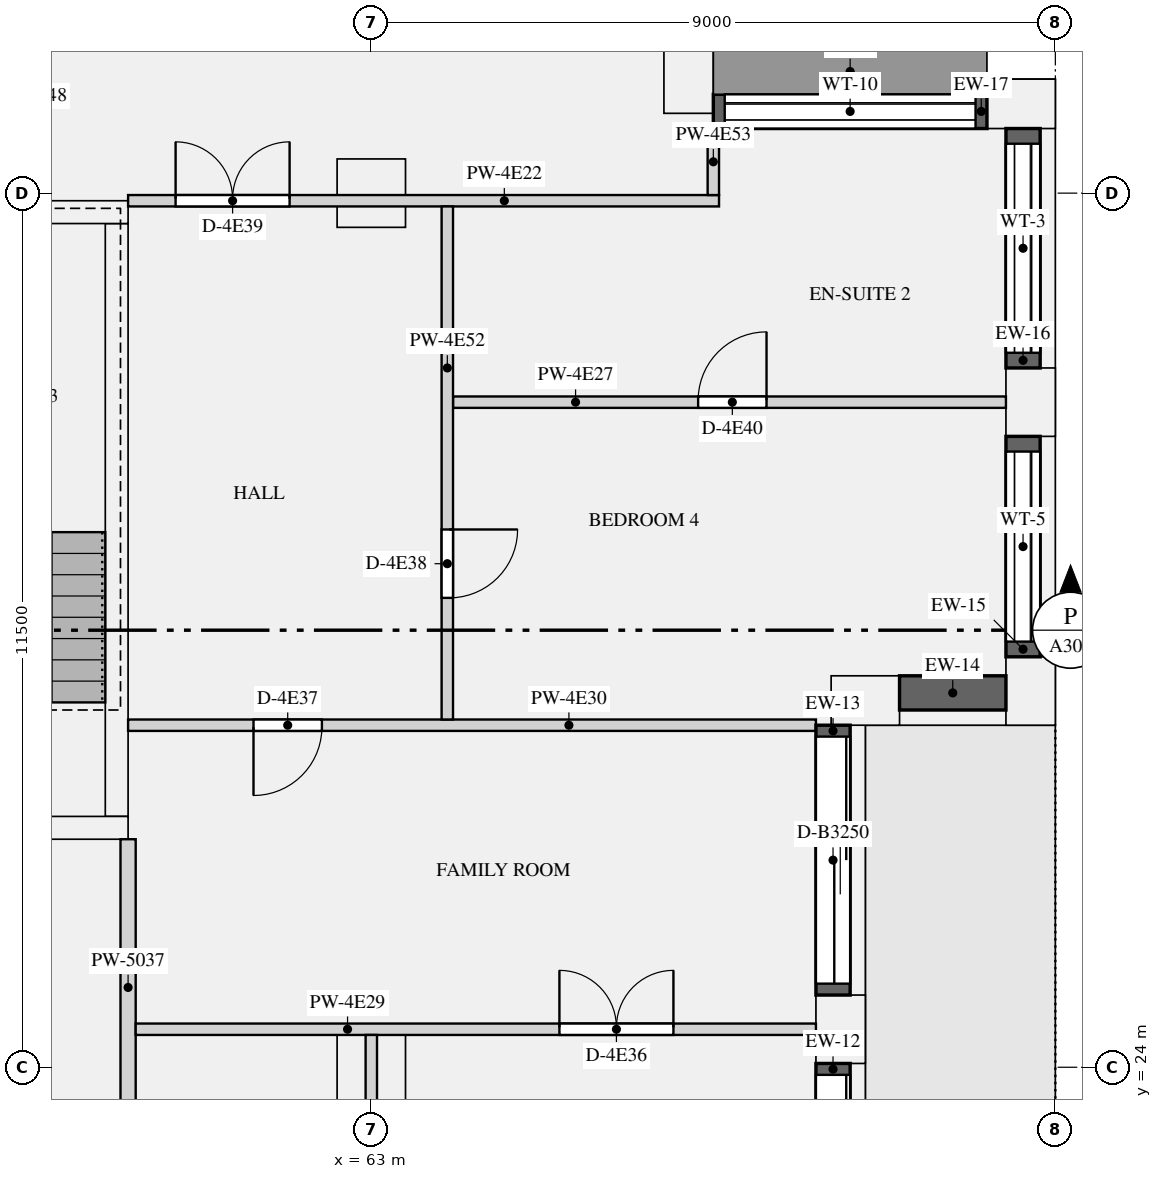
"""IFC4 building model, lengths in metres.
Left out: names, types, materials, properties, quantities, classifications, styles, units other than length and angle.
Written with IfcOpenShell. Run it as: python <this file> out.ifc"""

import sys

from ifc_helpers import new_model, si_unit, direction, frame, frame_2d, origin, origin_2d, place, context, subcontext, project, spatial, rectangle, extrude, element, fill, save


model = new_model("IFC4")
c1 = context("Model", 3, precision=1e-05, world=origin(), true_north=direction((0.0, 1.0)))
c2 = subcontext(c1, "Body", "Model", "MODEL_VIEW")
j1 = project(units=[si_unit("LENGTHUNIT", "METRE"), si_unit("PLANEANGLEUNIT", "RADIAN")], contexts=[c1])
p1 = place(None, origin())
s1 = spatial("IfcSite", under=j1, at=p1, CompositionType="ELEMENT")
p2 = place(p1, origin())
s2 = spatial("IfcBuilding", under=s1, at=p2, CompositionType="ELEMENT")
p3 = place(p2, frame((0.0, 0.0, 229.5)))
s3 = spatial("IfcBuildingStorey", under=s2, at=p3, CompositionType="ELEMENT", Elevation=229.5)
for number, where, z_axis, x_axis in (
    (1, (69.175, 24.5, 0.0), (0.0, 0.0, 1.0), (0.0, 1.0, 0.0)),
    (2, (69.5, 28.825, 0.0), (0.0, 0.0, 1.0), (1.0, 0.0, 0.0)),
    (3, (71.675, 28.95, 0.0), (0.0, 0.0, 1.0), (0.0, 1.0, 0.0)),
    (4, (71.675, 32.75, 0.0), (0.0, 0.0, 1.0), (0.0, 1.0, 0.0)),
    (5, (71.55, 36.675, 0.0), (0.0, 0.0, 1.0), (-1.0, 0.0, 0.0)),
    (6, (67.175, 37.0, 0.0), (0.0, 0.0, 1.0), (0.0, 1.0, 0.0)),
):
    element("IfcColumn", number, at=place(p3, frame(where, z_axis=z_axis, x_axis=x_axis)), inside=s3, PredefinedType="USERDEFINED", context=c2, shape_type="SweptSolid", body=[
        extrude(rectangle(XDim=0.9, YDim=0.65, at=origin_2d()), origin(), (0.0, 0.0, 1.0), 3.15),
    ])
for number, where, z_axis, x_axis in (
    (7, (63.0, 24.0, 0.0), (0.0, 0.0, 1.0), (1.0, 0.0, 0.0)),
    (8, (63.0, 35.5, 0.0), (0.0, 0.0, 1.0), (1.0, 0.0, 0.0)),
):
    element("IfcColumn", number, at=place(p3, frame(where, z_axis=z_axis, x_axis=x_axis)), inside=s3, PredefinedType="COLUMN", context=c2, shape_type="SweptSolid", body=[
        extrude(rectangle(XDim=0.9, YDim=0.9, at=origin_2d()), origin(), (0.0, 0.0, 1.0), 3.15),
    ])
p4 = place(p3, frame((56.2, 27.15, 0.0), z_axis=(0.0, 0.0, 1.0), x_axis=(1.0, 0.0, 0.0)))
e9 = element("IfcWall", 9, at=p4, inside=s3, PredefinedType="SHEAR", context=c2, shape_type="SweptSolid", body=[
    extrude(rectangle(XDim=3.6, YDim=0.3, at=frame_2d((1.8, 0.0))), origin(), (0.0, 0.0, 1.0), 3.15),
])
p5 = place(p4, frame((1.25, 0.0, 0.0)))
e10 = element("IfcOpeningElement", 10, at=p5, cuts=e9, PredefinedType="OPENING", context=c2, shape_type="SweptSolid", body=[
    extrude(rectangle(XDim=1.1, YDim=2.1, at=frame_2d((0.55, 1.05))), frame((0.0, 0.16, 0.0), z_axis=(0.0, -1.0, 0.0), x_axis=(1.0, 0.0, 0.0)), (0.0, 0.0, 1.0), 0.32),
])
p6 = place(p3, frame((56.2, 35.25, 0.0), z_axis=(0.0, 0.0, 1.0), x_axis=(1.0, 0.0, 0.0)))
e11 = element("IfcWall", 11, at=p6, inside=s3, PredefinedType="SHEAR", context=c2, shape_type="SweptSolid", body=[
    extrude(rectangle(XDim=3.6, YDim=0.3, at=frame_2d((1.8, 0.0))), origin(), (0.0, 0.0, 1.0), 3.15),
])
p7 = place(p3, frame((59.65, 27.3, 0.0), z_axis=(0.0, 0.0, 1.0), x_axis=(0.0, 1.0, 0.0)))
e12 = element("IfcWall", 12, at=p7, inside=s3, PredefinedType="SHEAR", context=c2, shape_type="SweptSolid", body=[
    extrude(rectangle(XDim=7.8, YDim=0.3, at=frame_2d((3.9, 0.0))), origin(), (0.0, 0.0, 1.0), 3.15),
])
p8 = place(p3, frame((69.075, 20.95, 0.0), z_axis=(0.0, 0.0, 1.0), x_axis=(0.0, 1.0, 0.0)))
e13 = element("IfcWall", 13, at=p8, inside=s3, PredefinedType="SOLIDWALL", context=c2, shape_type="SweptSolid", body=[
    extrude(rectangle(XDim=3.1, YDim=0.45, at=frame_2d((1.55, 0.0))), origin(), (0.0, 0.0, 1.0), 2.83),
])
p9 = place(p8, frame((0.15, 0.0, 0.0)))
e14 = element("IfcOpeningElement", 14, at=p9, cuts=e13, PredefinedType="OPENING", context=c2, shape_type="SweptSolid", body=[
    extrude(rectangle(XDim=2.8, YDim=2.3, at=frame_2d((1.4, 1.15))), frame((0.0, 0.235, 0.0), z_axis=(0.0, -1.0, 0.0), x_axis=(1.0, 0.0, 0.0)), (0.0, 0.0, 1.0), 0.47),
])
p10 = place(p3, frame((69.075, 24.95, 0.0), z_axis=(0.0, 0.0, 1.0), x_axis=(0.0, 1.0, 0.0)))
e15 = element("IfcWall", 15, at=p10, inside=s3, PredefinedType="SOLIDWALL", context=c2, shape_type="SweptSolid", body=[
    extrude(rectangle(XDim=3.55, YDim=0.45, at=frame_2d((1.775, 0.0))), origin(), (0.0, 0.0, 1.0), 2.83),
])
p11 = place(p10, frame((0.15, 0.0, 0.0)))
e16 = element("IfcOpeningElement", 16, at=p11, cuts=e15, PredefinedType="OPENING", context=c2, shape_type="SweptSolid", body=[
    extrude(rectangle(XDim=3.25, YDim=2.3, at=frame_2d((1.625, 1.15))), frame((0.0, 0.235, 0.0), z_axis=(0.0, -1.0, 0.0), x_axis=(1.0, 0.0, 0.0)), (0.0, 0.0, 1.0), 0.47),
])
p12 = place(p3, frame((69.95, 28.925, 0.9), z_axis=(0.0, 0.0, 1.0), x_axis=(1.0, 0.0, 0.0)))
e17 = element("IfcWall", 17, at=p12, inside=s3, PredefinedType="SOLIDWALL", context=c2, shape_type="SweptSolid", body=[
    extrude(rectangle(XDim=1.4, YDim=0.45, at=frame_2d((0.7, 0.0))), origin(), (0.0, 0.0, 1.0), 1.93),
])
p13 = place(p3, frame((71.575, 29.4, 0.9), z_axis=(0.0, 0.0, 1.0), x_axis=(0.0, 1.0, 0.0)))
e18 = element("IfcWall", 18, at=p13, inside=s3, PredefinedType="SOLIDWALL", context=c2, shape_type="SweptSolid", body=[
    extrude(rectangle(XDim=2.9, YDim=0.45, at=frame_2d((1.45, 0.0))), origin(), (0.0, 0.0, 1.0), 1.93),
])
p14 = place(p13, frame((0.2, 0.0, 0.15)))
e19 = element("IfcOpeningElement", 19, at=p14, cuts=e18, PredefinedType="OPENING", context=c2, shape_type="SweptSolid", body=[
    extrude(rectangle(XDim=2.5, YDim=1.5, at=frame_2d((1.25, 0.75))), frame((0.0, 0.235, 0.0), z_axis=(0.0, -1.0, 0.0), x_axis=(1.0, 0.0, 0.0)), (0.0, 0.0, 1.0), 0.47),
])
p15 = place(p3, frame((71.575, 33.2, 0.9), z_axis=(0.0, 0.0, 1.0), x_axis=(0.0, 1.0, 0.0)))
e20 = element("IfcWall", 20, at=p15, inside=s3, PredefinedType="SOLIDWALL", context=c2, shape_type="SweptSolid", body=[
    extrude(rectangle(XDim=3.15, YDim=0.45, at=frame_2d((1.575, 0.0))), origin(), (0.0, 0.0, 1.0), 1.93),
])
p16 = place(p15, frame((0.2, 0.0, 0.15)))
e21 = element("IfcOpeningElement", 21, at=p16, cuts=e20, PredefinedType="OPENING", context=c2, shape_type="SweptSolid", body=[
    extrude(rectangle(XDim=2.75, YDim=1.5, at=frame_2d((1.375, 0.75))), frame((0.0, 0.235, 0.0), z_axis=(0.0, -1.0, 0.0), x_axis=(1.0, 0.0, 0.0)), (0.0, 0.0, 1.0), 0.47),
])
p17 = place(p3, frame((71.1, 36.575, 0.9), z_axis=(0.0, 0.0, 1.0), x_axis=(-1.0, 0.0, 0.0)))
e22 = element("IfcWall", 22, at=p17, inside=s3, PredefinedType="SOLIDWALL", context=c2, shape_type="SweptSolid", body=[
    extrude(rectangle(XDim=3.6, YDim=0.45, at=frame_2d((1.8, 0.0))), origin(), (0.0, 0.0, 1.0), 1.93),
])
p18 = place(p17, frame((0.15, 0.0, 0.15)))
e23 = element("IfcOpeningElement", 23, at=p18, cuts=e22, PredefinedType="OPENING", context=c2, shape_type="SweptSolid", body=[
    extrude(rectangle(XDim=3.3, YDim=1.5, at=frame_2d((1.65, 0.75))), frame((0.0, 0.235, 0.0), z_axis=(0.0, -1.0, 0.0), x_axis=(1.0, 0.0, 0.0)), (0.0, 0.0, 1.0), 0.47),
])
p19 = place(p3, frame((59.8, 23.1, 0.0), z_axis=(0.0, 0.0, 1.0), x_axis=(0.0, 1.0, 0.0)))
e24 = element("IfcWall", 24, at=p19, inside=s3, PredefinedType="PARTITIONING", context=c2, shape_type="SweptSolid", body=[
    extrude(rectangle(XDim=3.9, YDim=0.2, at=frame_2d((1.95, 0.0))), origin(), (0.0, 0.0, 1.0), 2.83),
])
p20 = place(p3, frame((59.8, 35.4, 0.0), z_axis=(0.0, 0.0, 1.0), x_axis=(1.0, 0.0, 0.0)))
e25 = element("IfcWall", 25, at=p20, inside=s3, PredefinedType="PARTITIONING", context=c2, shape_type="SweptSolid", body=[
    extrude(rectangle(XDim=7.775, YDim=0.15, at=frame_2d((3.887, 0.0))), origin(), (0.0, 0.0, 1.0), 2.83),
])
p21 = place(p20, frame((0.625, 0.0, 0.0)))
e26 = element("IfcOpeningElement", 26, at=p21, cuts=e25, PredefinedType="OPENING", context=c2, shape_type="SweptSolid", body=[
    extrude(rectangle(XDim=1.5, YDim=2.1, at=frame_2d((0.75, 1.05))), frame((0.0, 0.085, 0.0), z_axis=(0.0, -1.0, 0.0), x_axis=(1.0, 0.0, 0.0)), (0.0, 0.0, 1.0), 0.17),
])
p22 = place(p3, frame((64.075, 32.75, 0.0), z_axis=(0.0, 0.0, 1.0), x_axis=(1.0, 0.0, 0.0)))
e27 = element("IfcWall", 27, at=p22, inside=s3, PredefinedType="PARTITIONING", context=c2, shape_type="SweptSolid", body=[
    extrude(rectangle(XDim=7.275, YDim=0.15, at=frame_2d((3.638, 0.0))), origin(), (0.0, 0.0, 1.0), 2.83),
])
p23 = place(p22, frame((3.225, 0.0, 0.0)))
e28 = element("IfcOpeningElement", 28, at=p23, cuts=e27, PredefinedType="OPENING", context=c2, shape_type="SweptSolid", body=[
    extrude(rectangle(XDim=0.9, YDim=2.1, at=frame_2d((0.45, 1.05))), frame((0.0, 0.085, 0.0), z_axis=(0.0, -1.0, 0.0), x_axis=(1.0, 0.0, 0.0)), (0.0, 0.0, 1.0), 0.17),
])
p24 = place(p3, frame((59.9, 24.5, 0.0), z_axis=(0.0, 0.0, 1.0), x_axis=(1.0, 0.0, 0.0)))
e29 = element("IfcWall", 29, at=p24, inside=s3, PredefinedType="PARTITIONING", context=c2, shape_type="SweptSolid", body=[
    extrude(rectangle(XDim=8.95, YDim=0.15, at=frame_2d((4.475, 0.0))), origin(), (0.0, 0.0, 1.0), 2.83),
])
p25 = place(p24, frame((5.575, 0.0, 0.0)))
e30 = element("IfcOpeningElement", 30, at=p25, cuts=e29, PredefinedType="OPENING", context=c2, shape_type="SweptSolid", body=[
    extrude(rectangle(XDim=1.5, YDim=2.1, at=frame_2d((0.75, 1.05))), frame((0.0, 0.085, 0.0), z_axis=(0.0, -1.0, 0.0), x_axis=(1.0, 0.0, 0.0)), (0.0, 0.0, 1.0), 0.17),
])
p26 = place(p3, frame((59.8, 28.5, 0.0), z_axis=(0.0, 0.0, 1.0), x_axis=(1.0, 0.0, 0.0)))
e31 = element("IfcWall", 31, at=p26, inside=s3, PredefinedType="PARTITIONING", context=c2, shape_type="SweptSolid", body=[
    extrude(rectangle(XDim=9.05, YDim=0.15, at=frame_2d((4.525, 0.0))), origin(), (0.0, 0.0, 1.0), 2.83),
])
p27 = place(p26, frame((1.65, 0.0, 0.0)))
e32 = element("IfcOpeningElement", 32, at=p27, cuts=e31, PredefinedType="OPENING", context=c2, shape_type="SweptSolid", body=[
    extrude(rectangle(XDim=0.9, YDim=2.1, at=frame_2d((0.45, 1.05))), frame((0.0, 0.085, 0.0), z_axis=(0.0, -1.0, 0.0), x_axis=(1.0, 0.0, 0.0)), (0.0, 0.0, 1.0), 0.17),
])
p28 = place(p3, frame((63.0, 12.575, 0.0), z_axis=(0.0, 0.0, 1.0), x_axis=(0.0, 1.0, 0.0)))
e33 = element("IfcWall", 33, at=p28, inside=s3, PredefinedType="PARTITIONING", context=c2, shape_type="SweptSolid", body=[
    extrude(rectangle(XDim=11.85, YDim=0.15, at=frame_2d((5.925, 0.0))), origin(), (0.0, 0.0, 1.0), 2.83),
])
p29 = place(p28, frame((8.25, 0.0, 0.0)))
e34 = element("IfcOpeningElement", 34, at=p29, cuts=e33, PredefinedType="OPENING", context=c2, shape_type="SweptSolid", body=[
    extrude(rectangle(XDim=0.9, YDim=2.1, at=frame_2d((0.45, 1.05))), frame((0.0, 0.085, 0.0), z_axis=(0.0, -1.0, 0.0), x_axis=(1.0, 0.0, 0.0)), (0.0, 0.0, 1.0), 0.17),
])
p30 = place(p3, frame((64.0, 28.575, 0.0), z_axis=(0.0, 0.0, 1.0), x_axis=(0.0, 1.0, 0.0)))
e35 = element("IfcWall", 35, at=p30, inside=s3, PredefinedType="PARTITIONING", context=c2, shape_type="SweptSolid", body=[
    extrude(rectangle(XDim=6.75, YDim=0.15, at=frame_2d((3.375, 0.0))), origin(), (0.0, 0.0, 1.0), 2.83),
])
p31 = place(p30, frame((1.6, 0.0, 0.0)))
e36 = element("IfcOpeningElement", 36, at=p31, cuts=e35, PredefinedType="OPENING", context=c2, shape_type="SweptSolid", body=[
    extrude(rectangle(XDim=0.9, YDim=2.1, at=frame_2d((0.45, 1.05))), frame((0.0, 0.085, 0.0), z_axis=(0.0, -1.0, 0.0), x_axis=(1.0, 0.0, 0.0)), (0.0, 0.0, 1.0), 0.17),
])
p32 = place(p3, frame((67.5, 35.475, 0.0), z_axis=(0.0, 0.0, 1.0), x_axis=(0.0, 1.0, 0.0)))
e37 = element("IfcWall", 37, at=p32, inside=s3, PredefinedType="PARTITIONING", context=c2, shape_type="SweptSolid", body=[
    extrude(rectangle(XDim=0.875, YDim=0.15, at=frame_2d((0.438, 0.0))), origin(), (0.0, 0.0, 1.0), 2.83),
])
p33 = place(p9, origin())
e38 = element("IfcDoor", 38, at=p33, inside=s3, OperationType="SLIDING_TO_LEFT", PredefinedType="DOOR", context=c2, shape_type="SweptSolid", body=[
    extrude(rectangle(XDim=2.8, YDim=2.3, at=frame_2d((1.4, 1.15))), frame((0.0, -0.07, 0.0), z_axis=(0.0, -1.0, 0.0), x_axis=(1.0, 0.0, 0.0)), (0.0, 0.0, 1.0), 0.05),
])
fill(e14, e38)
p34 = place(p11, origin())
e39 = element("IfcDoor", 39, at=p34, inside=s3, OperationType="SLIDING_TO_LEFT", PredefinedType="DOOR", context=c2, shape_type="SweptSolid", body=[
    extrude(rectangle(XDim=3.25, YDim=2.3, at=frame_2d((1.625, 1.15))), frame((0.0, -0.07, 0.0), z_axis=(0.0, -1.0, 0.0), x_axis=(1.0, 0.0, 0.0)), (0.0, 0.0, 1.0), 0.05),
])
fill(e16, e39)
p35 = place(p14, origin())
e40 = element("IfcWindow", 40, at=p35, inside=s3, PartitioningType="SINGLE_PANEL", PredefinedType="WINDOW", context=c2, shape_type="SweptSolid", body=[
    extrude(rectangle(XDim=2.5, YDim=1.5, at=frame_2d((1.25, 0.75))), frame((0.0, -0.065, 0.0), z_axis=(0.0, -1.0, 0.0), x_axis=(1.0, 0.0, 0.0)), (0.0, 0.0, 1.0), 0.06),
])
fill(e19, e40)
p36 = place(p16, origin())
e41 = element("IfcWindow", 41, at=p36, inside=s3, PartitioningType="SINGLE_PANEL", PredefinedType="WINDOW", context=c2, shape_type="SweptSolid", body=[
    extrude(rectangle(XDim=2.75, YDim=1.5, at=frame_2d((1.375, 0.75))), frame((0.0, -0.065, 0.0), z_axis=(0.0, -1.0, 0.0), x_axis=(1.0, 0.0, 0.0)), (0.0, 0.0, 1.0), 0.06),
])
fill(e21, e41)
p37 = place(p18, origin())
e42 = element("IfcWindow", 42, at=p37, inside=s3, PartitioningType="SINGLE_PANEL", PredefinedType="WINDOW", context=c2, shape_type="SweptSolid", body=[
    extrude(rectangle(XDim=3.3, YDim=1.5, at=frame_2d((1.65, 0.75))), frame((0.0, -0.065, 0.0), z_axis=(0.0, -1.0, 0.0), x_axis=(1.0, 0.0, 0.0)), (0.0, 0.0, 1.0), 0.06),
])
fill(e23, e42)
p38 = place(p25, origin())
e43 = element("IfcDoor", 43, at=p38, inside=s3, OperationType="DOUBLE_DOOR_SINGLE_SWING", PredefinedType="DOOR", context=c2, shape_type="SweptSolid", body=[
    extrude(rectangle(XDim=1.5, YDim=2.1, at=frame_2d((0.75, 1.05))), frame((0.0, 0.025, 0.0), z_axis=(0.0, -1.0, 0.0), x_axis=(1.0, 0.0, 0.0)), (0.0, 0.0, 1.0), 0.05),
])
fill(e30, e43)
p39 = place(p27, frame((0.9, 0.0, 0.0), z_axis=(0.0, 0.0, 1.0), x_axis=(-1.0, 0.0, 0.0)))
e44 = element("IfcDoor", 44, at=p39, inside=s3, OperationType="SINGLE_SWING_RIGHT", PredefinedType="DOOR", context=c2, shape_type="SweptSolid", body=[
    extrude(rectangle(XDim=0.9, YDim=2.1, at=frame_2d((0.45, 1.05))), frame((0.0, 0.025, 0.0), z_axis=(0.0, -1.0, 0.0), x_axis=(1.0, 0.0, 0.0)), (0.0, 0.0, 1.0), 0.05),
])
fill(e32, e44)
p40 = place(p31, frame((0.9, 0.0, 0.0), z_axis=(0.0, 0.0, 1.0), x_axis=(-1.0, 0.0, 0.0)))
e45 = element("IfcDoor", 45, at=p40, inside=s3, OperationType="SINGLE_SWING_LEFT", PredefinedType="DOOR", context=c2, shape_type="SweptSolid", body=[
    extrude(rectangle(XDim=0.9, YDim=2.1, at=frame_2d((0.45, 1.05))), frame((0.0, 0.025, 0.0), z_axis=(0.0, -1.0, 0.0), x_axis=(1.0, 0.0, 0.0)), (0.0, 0.0, 1.0), 0.05),
])
fill(e36, e45)
p41 = place(p21, origin())
e46 = element("IfcDoor", 46, at=p41, inside=s3, OperationType="DOUBLE_DOOR_SINGLE_SWING", PredefinedType="DOOR", context=c2, shape_type="SweptSolid", body=[
    extrude(rectangle(XDim=1.5, YDim=2.1, at=frame_2d((0.75, 1.05))), frame((0.0, 0.025, 0.0), z_axis=(0.0, -1.0, 0.0), x_axis=(1.0, 0.0, 0.0)), (0.0, 0.0, 1.0), 0.05),
])
fill(e26, e46)
p42 = place(p23, origin())
e47 = element("IfcDoor", 47, at=p42, inside=s3, OperationType="SINGLE_SWING_RIGHT", PredefinedType="DOOR", context=c2, shape_type="SweptSolid", body=[
    extrude(rectangle(XDim=0.9, YDim=2.1, at=frame_2d((0.45, 1.05))), frame((0.0, 0.025, 0.0), z_axis=(0.0, -1.0, 0.0), x_axis=(1.0, 0.0, 0.0)), (0.0, 0.0, 1.0), 0.05),
])
fill(e28, e47)
save(model, sys.argv[1])
